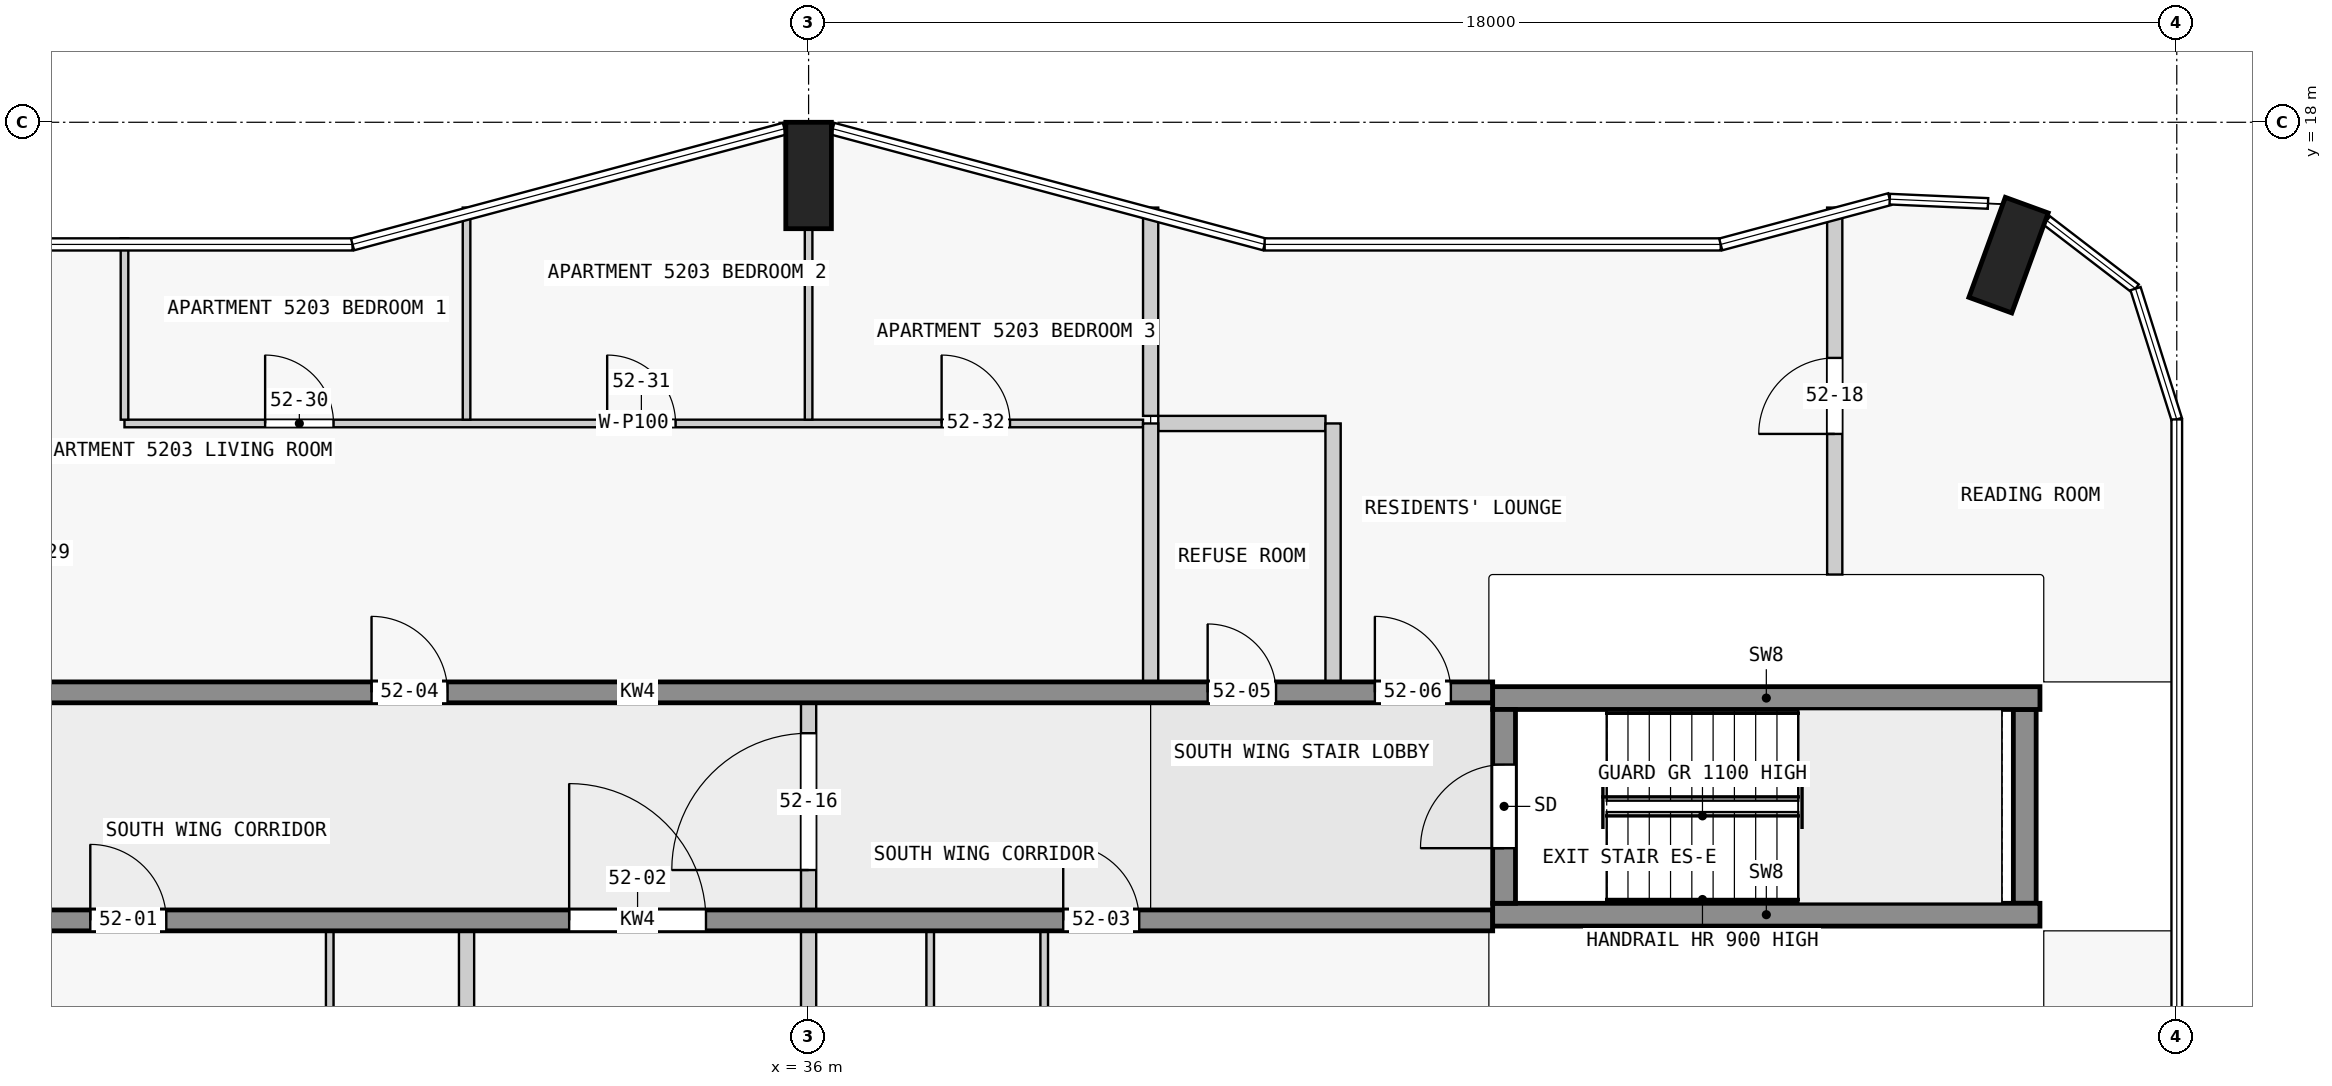
"""IFC4 building model, lengths in metres.
Left out: names, types, materials, properties, quantities, classifications, styles, units other than length and angle.
Written with IfcOpenShell. Run it as: python <this file> out.ifc"""

import sys

from ifc_helpers import new_model, si_unit, direction, frame, frame_2d, origin, origin_2d, place, context, subcontext, project, spatial, rectangle, extrude, element, fill, save


model = new_model("IFC4")
c1 = context("Model", 3, precision=1e-05, world=origin(), true_north=direction((0.0, 1.0)))
c2 = subcontext(c1, "Body", "Model", "MODEL_VIEW")
j1 = project(units=[si_unit("LENGTHUNIT", "METRE"), si_unit("PLANEANGLEUNIT", "RADIAN")], contexts=[c1])
p1 = place(None, origin())
s1 = spatial("IfcSite", under=j1, at=p1, CompositionType="ELEMENT")
p2 = place(p1, origin())
s2 = spatial("IfcBuilding", under=s1, at=p2, CompositionType="ELEMENT")
p3 = place(p2, frame((0.0, 0.0, 201.4)))
s3 = spatial("IfcBuildingStorey", under=s2, at=p3, CompositionType="ELEMENT", Elevation=201.4)
for number, where, z_axis, x_axis in (
    (1, (51.787, 16.252, 0.0), (0.0, 0.0, 1.0), (-0.94, 0.342, 0.0)),
    (2, (36.0, 17.3, 0.0), (0.0, 0.0, 1.0), (1.0, 0.0, 0.0)),
):
    element("IfcColumn", number, at=place(p3, frame(where, z_axis=z_axis, x_axis=x_axis)), inside=s3, PredefinedType="COLUMN", context=c2, shape_type="SweptSolid", body=[
        extrude(rectangle(XDim=0.6, YDim=1.4, at=origin_2d()), origin(), (0.0, 0.0, 1.0), 3.5),
    ])
p4 = place(p3, frame((45.15, 7.725, 0.0), z_axis=(0.0, 0.0, 1.0), x_axis=(0.0, 1.0, 0.0)))
e3 = element("IfcWall", 3, at=p4, inside=s3, PredefinedType="SHEAR", context=c2, shape_type="SweptSolid", body=[
    extrude(rectangle(XDim=2.55, YDim=0.3, at=frame_2d((1.275, 0.0))), origin(), (0.0, 0.0, 1.0), 3.5),
])
p5 = place(p4, frame((0.725, 0.0, 0.0)))
e4 = element("IfcOpeningElement", 4, at=p5, cuts=e3, PredefinedType="OPENING", context=c2, shape_type="SweptSolid", body=[
    extrude(rectangle(XDim=1.1, YDim=2.1, at=frame_2d((0.55, 1.05))), frame((0.0, 0.16, 0.0), z_axis=(0.0, -1.0, 0.0), x_axis=(1.0, 0.0, 0.0)), (0.0, 0.0, 1.0), 0.32),
])
p6 = place(p3, frame((52.0, 7.725, 0.0), z_axis=(0.0, 0.0, 1.0), x_axis=(0.0, 1.0, 0.0)))
e5 = element("IfcWall", 5, at=p6, inside=s3, PredefinedType="SHEAR", context=c2, shape_type="SweptSolid", body=[
    extrude(rectangle(XDim=2.55, YDim=0.3, at=frame_2d((1.275, 0.0))), origin(), (0.0, 0.0, 1.0), 3.5),
])
for number, where, z_axis, x_axis in (
    (6, (45.0, 7.575, 0.0), (0.0, 0.0, 1.0), (1.0, 0.0, 0.0)),
    (7, (45.0, 10.425, 0.0), (0.0, 0.0, 1.0), (1.0, 0.0, 0.0)),
):
    element("IfcWall", number, at=place(p3, frame(where, z_axis=z_axis, x_axis=x_axis)), inside=s3, PredefinedType="SHEAR", context=c2, shape_type="SweptSolid", body=[
        extrude(rectangle(XDim=7.2, YDim=0.3, at=frame_2d((3.6, 0.0))), origin(), (0.0, 0.0, 1.0), 3.5),
    ])
p7 = place(p3, frame((22.5, 7.5, 0.0), z_axis=(0.0, 0.0, 1.0), x_axis=(1.0, 0.0, 0.0)))
e8 = element("IfcWall", 8, at=p7, inside=s3, PredefinedType="SHEAR", context=c2, shape_type="SweptSolid", body=[
    extrude(rectangle(XDim=22.5, YDim=0.275, at=frame_2d((11.25, 0.0))), origin(), (0.0, 0.0, 1.0), 3.25),
])
p8 = place(p7, frame((4.05, 0.0, 0.0)))
e9 = element("IfcOpeningElement", 9, at=p8, cuts=e8, PredefinedType="OPENING", context=c2, shape_type="SweptSolid", body=[
    extrude(rectangle(XDim=1.0, YDim=2.1, at=frame_2d((0.5, 1.05))), frame((0.0, 0.147, 0.0), z_axis=(0.0, -1.0, 0.0), x_axis=(1.0, 0.0, 0.0)), (0.0, 0.0, 1.0), 0.295),
])
p9 = place(p7, frame((10.35, 0.0, 0.0)))
e10 = element("IfcOpeningElement", 10, at=p9, cuts=e8, PredefinedType="OPENING", context=c2, shape_type="SweptSolid", body=[
    extrude(rectangle(XDim=1.8, YDim=2.1, at=frame_2d((0.9, 1.05))), frame((0.0, 0.147, 0.0), z_axis=(0.0, -1.0, 0.0), x_axis=(1.0, 0.0, 0.0)), (0.0, 0.0, 1.0), 0.295),
])
p10 = place(p7, frame((16.85, 0.0, 0.0)))
e11 = element("IfcOpeningElement", 11, at=p10, cuts=e8, PredefinedType="OPENING", context=c2, shape_type="SweptSolid", body=[
    extrude(rectangle(XDim=1.0, YDim=2.1, at=frame_2d((0.5, 1.05))), frame((0.0, 0.147, 0.0), z_axis=(0.0, -1.0, 0.0), x_axis=(1.0, 0.0, 0.0)), (0.0, 0.0, 1.0), 0.295),
])
p11 = place(p3, frame((22.5, 10.5, 0.0), z_axis=(0.0, 0.0, 1.0), x_axis=(1.0, 0.0, 0.0)))
e12 = element("IfcWall", 12, at=p11, inside=s3, PredefinedType="SHEAR", context=c2, shape_type="SweptSolid", body=[
    extrude(rectangle(XDim=22.5, YDim=0.275, at=frame_2d((11.25, 0.0))), origin(), (0.0, 0.0, 1.0), 3.25),
])
p12 = place(p11, frame((7.75, 0.0, 0.0)))
e13 = element("IfcOpeningElement", 13, at=p12, cuts=e12, PredefinedType="OPENING", context=c2, shape_type="SweptSolid", body=[
    extrude(rectangle(XDim=1.0, YDim=2.1, at=frame_2d((0.5, 1.05))), frame((0.0, 0.147, 0.0), z_axis=(0.0, -1.0, 0.0), x_axis=(1.0, 0.0, 0.0)), (0.0, 0.0, 1.0), 0.295),
])
p13 = place(p11, frame((18.75, 0.0, 0.0)))
e14 = element("IfcOpeningElement", 14, at=p13, cuts=e12, PredefinedType="OPENING", context=c2, shape_type="SweptSolid", body=[
    extrude(rectangle(XDim=0.9, YDim=2.1, at=frame_2d((0.45, 1.05))), frame((0.0, 0.147, 0.0), z_axis=(0.0, -1.0, 0.0), x_axis=(1.0, 0.0, 0.0)), (0.0, 0.0, 1.0), 0.295),
])
p14 = place(p11, frame((20.95, 0.0, 0.0)))
e15 = element("IfcOpeningElement", 15, at=p14, cuts=e12, PredefinedType="OPENING", context=c2, shape_type="SweptSolid", body=[
    extrude(rectangle(XDim=1.0, YDim=2.1, at=frame_2d((0.5, 1.05))), frame((0.0, 0.147, 0.0), z_axis=(0.0, -1.0, 0.0), x_axis=(1.0, 0.0, 0.0)), (0.0, 0.0, 1.0), 0.295),
])
p15 = place(p3, frame((27.0, 14.038, 0.0), z_axis=(0.0, 0.0, 1.0), x_axis=(1.0, 0.0, 0.0)))
e16 = element("IfcWall", 16, at=p15, inside=s3, PredefinedType="PARTITIONING", context=c2, shape_type="SweptSolid", body=[
    extrude(rectangle(XDim=13.4, YDim=0.1, at=frame_2d((6.7, 0.0))), origin(), (0.0, 0.0, 1.0), 3.25),
])
p16 = place(p15, frame((1.85, 0.0, 0.0)))
e17 = element("IfcOpeningElement", 17, at=p16, cuts=e16, PredefinedType="OPENING", context=c2, shape_type="SweptSolid", body=[
    extrude(rectangle(XDim=0.9, YDim=2.1, at=frame_2d((0.45, 1.05))), frame((0.0, 0.06, 0.0), z_axis=(0.0, -1.0, 0.0), x_axis=(1.0, 0.0, 0.0)), (0.0, 0.0, 1.0), 0.12),
])
p17 = place(p15, frame((6.35, 0.0, 0.0)))
e18 = element("IfcOpeningElement", 18, at=p17, cuts=e16, PredefinedType="OPENING", context=c2, shape_type="SweptSolid", body=[
    extrude(rectangle(XDim=0.9, YDim=2.1, at=frame_2d((0.45, 1.05))), frame((0.0, 0.06, 0.0), z_axis=(0.0, -1.0, 0.0), x_axis=(1.0, 0.0, 0.0)), (0.0, 0.0, 1.0), 0.12),
])
p18 = place(p15, frame((10.75, 0.0, 0.0)))
e19 = element("IfcOpeningElement", 19, at=p18, cuts=e16, PredefinedType="OPENING", context=c2, shape_type="SweptSolid", body=[
    extrude(rectangle(XDim=0.9, YDim=2.1, at=frame_2d((0.45, 1.05))), frame((0.0, 0.06, 0.0), z_axis=(0.0, -1.0, 0.0), x_axis=(1.0, 0.0, 0.0)), (0.0, 0.0, 1.0), 0.12),
])
p19 = place(p3, frame((42.8, 14.038, 0.0), z_axis=(0.0, 0.0, 1.0), x_axis=(-1.0, 0.0, 0.0)))
e20 = element("IfcWall", 20, at=p19, inside=s3, PredefinedType="PARTITIONING", context=c2, shape_type="SweptSolid", body=[
    extrude(rectangle(XDim=2.2, YDim=0.2, at=frame_2d((1.1, 0.0))), origin(), (0.0, 0.0, 1.0), 3.25),
])
p20 = place(p3, frame((27.0, 16.473, 0.0), z_axis=(0.0, 0.0, 1.0), x_axis=(0.0, -1.0, 0.0)))
e21 = element("IfcWall", 21, at=p20, inside=s3, PredefinedType="PARTITIONING", context=c2, shape_type="SweptSolid", body=[
    extrude(rectangle(XDim=2.386, YDim=0.1, at=frame_2d((1.193, 0.0))), origin(), (0.0, 0.0, 1.0), 3.25),
])
p21 = place(p3, frame((29.7, 7.363, 0.0), z_axis=(0.0, 0.0, 1.0), x_axis=(0.0, -1.0, 0.0)))
e22 = element("IfcWall", 22, at=p21, inside=s3, PredefinedType="PARTITIONING", context=c2, shape_type="SweptSolid", body=[
    extrude(rectangle(XDim=3.4, YDim=0.1, at=frame_2d((1.7, 0.0))), origin(), (0.0, 0.0, 1.0), 3.25),
])
p22 = place(p21, frame((1.25, 0.0, 0.0)))
e23 = element("IfcOpeningElement", 23, at=p22, cuts=e22, PredefinedType="OPENING", context=c2, shape_type="SweptSolid", body=[
    extrude(rectangle(XDim=0.9, YDim=2.1, at=frame_2d((0.45, 1.05))), frame((0.0, 0.06, 0.0), z_axis=(0.0, -1.0, 0.0), x_axis=(1.0, 0.0, 0.0)), (0.0, 0.0, 1.0), 0.12),
])
p23 = place(p3, frame((31.5, 14.087, 0.0), z_axis=(0.0, 0.0, 1.0), x_axis=(0.0, 1.0, 0.0)))
e24 = element("IfcWall", 24, at=p23, inside=s3, PredefinedType="PARTITIONING", context=c2, shape_type="SweptSolid", body=[
    extrude(rectangle(XDim=2.79, YDim=0.1, at=frame_2d((1.395, 0.0))), origin(), (0.0, 0.0, 1.0), 3.25),
])
p24 = place(p3, frame((31.5, 3.962, 0.0), z_axis=(0.0, 0.0, 1.0), x_axis=(0.0, 1.0, 0.0)))
e25 = element("IfcWall", 25, at=p24, inside=s3, PredefinedType="PARTITIONING", context=c2, shape_type="SweptSolid", body=[
    extrude(rectangle(XDim=3.4, YDim=0.2, at=frame_2d((1.7, 0.0))), origin(), (0.0, 0.0, 1.0), 3.25),
])
p25 = place(p3, frame((36.0, 14.087, 0.0), z_axis=(0.0, 0.0, 1.0), x_axis=(0.0, 1.0, 0.0)))
e26 = element("IfcWall", 26, at=p25, inside=s3, PredefinedType="PARTITIONING", context=c2, shape_type="SweptSolid", body=[
    extrude(rectangle(XDim=2.513, YDim=0.1, at=frame_2d((1.256, 0.0))), origin(), (0.0, 0.0, 1.0), 3.25),
])
p26 = place(p3, frame((36.0, 1.4, 0.0), z_axis=(0.0, 0.0, 1.0), x_axis=(0.0, 1.0, 0.0)))
e27 = element("IfcWall", 27, at=p26, inside=s3, PredefinedType="PARTITIONING", context=c2, shape_type="SweptSolid", body=[
    extrude(rectangle(XDim=5.963, YDim=0.2, at=frame_2d((2.981, 0.0))), origin(), (0.0, 0.0, 1.0), 3.25),
])
p27 = place(p3, frame((37.6, 3.962, 0.0), z_axis=(0.0, 0.0, 1.0), x_axis=(0.0, 1.0, 0.0)))
e28 = element("IfcWall", 28, at=p27, inside=s3, PredefinedType="PARTITIONING", context=c2, shape_type="SweptSolid", body=[
    extrude(rectangle(XDim=3.4, YDim=0.1, at=frame_2d((1.7, 0.0))), origin(), (0.0, 0.0, 1.0), 3.25),
])
p28 = place(p3, frame((39.1, 3.962, 0.0), z_axis=(0.0, 0.0, 1.0), x_axis=(0.0, 1.0, 0.0)))
e29 = element("IfcWall", 29, at=p28, inside=s3, PredefinedType="PARTITIONING", context=c2, shape_type="SweptSolid", body=[
    extrude(rectangle(XDim=3.4, YDim=0.1, at=frame_2d((1.7, 0.0))), origin(), (0.0, 0.0, 1.0), 3.25),
])
p29 = place(p28, frame((1.25, 0.0, 0.0)))
e30 = element("IfcOpeningElement", 30, at=p29, cuts=e29, PredefinedType="OPENING", context=c2, shape_type="SweptSolid", body=[
    extrude(rectangle(XDim=0.9, YDim=2.1, at=frame_2d((0.45, 1.05))), frame((0.0, 0.06, 0.0), z_axis=(0.0, -1.0, 0.0), x_axis=(1.0, 0.0, 0.0)), (0.0, 0.0, 1.0), 0.12),
])
p30 = place(p3, frame((40.5, 14.038, 0.0), z_axis=(0.0, 0.0, 1.0), x_axis=(0.0, -1.0, 0.0)))
e31 = element("IfcWall", 31, at=p30, inside=s3, PredefinedType="PARTITIONING", context=c2, shape_type="SweptSolid", body=[
    extrude(rectangle(XDim=3.4, YDim=0.2, at=frame_2d((1.7, 0.0))), origin(), (0.0, 0.0, 1.0), 3.25),
])
p31 = place(p3, frame((40.5, 14.137, 0.0), z_axis=(0.0, 0.0, 1.0), x_axis=(0.0, 1.0, 0.0)))
e32 = element("IfcWall", 32, at=p31, inside=s3, PredefinedType="PARTITIONING", context=c2, shape_type="SweptSolid", body=[
    extrude(rectangle(XDim=2.74, YDim=0.2, at=frame_2d((1.37, 0.0))), origin(), (0.0, 0.0, 1.0), 3.25),
])
p32 = place(p3, frame((42.9, 10.637, 0.0), z_axis=(0.0, 0.0, 1.0), x_axis=(0.0, 1.0, 0.0)))
e33 = element("IfcWall", 33, at=p32, inside=s3, PredefinedType="PARTITIONING", context=c2, shape_type="SweptSolid", body=[
    extrude(rectangle(XDim=3.4, YDim=0.2, at=frame_2d((1.7, 0.0))), origin(), (0.0, 0.0, 1.0), 3.25),
])
p33 = place(p3, frame((49.5, 12.05, 0.0), z_axis=(0.0, 0.0, 1.0), x_axis=(0.0, 1.0, 0.0)))
e34 = element("IfcWall", 34, at=p33, inside=s3, PredefinedType="PARTITIONING", context=c2, shape_type="SweptSolid", body=[
    extrude(rectangle(XDim=4.828, YDim=0.2, at=frame_2d((2.414, 0.0))), origin(), (0.0, 0.0, 1.0), 3.25),
])
p34 = place(p33, frame((1.85, 0.0, 0.0)))
e35 = element("IfcOpeningElement", 35, at=p34, cuts=e34, PredefinedType="OPENING", context=c2, shape_type="SweptSolid", body=[
    extrude(rectangle(XDim=1.0, YDim=2.1, at=frame_2d((0.5, 1.05))), frame((0.0, 0.11, 0.0), z_axis=(0.0, -1.0, 0.0), x_axis=(1.0, 0.0, 0.0)), (0.0, 0.0, 1.0), 0.22),
])
p35 = place(p3, frame((36.0, 7.462, 0.0), z_axis=(0.0, 0.0, 1.0), x_axis=(0.0, 1.0, 0.0)))
e36 = element("IfcWall", 36, at=p35, inside=s3, PredefinedType="PARTITIONING", context=c2, shape_type="SweptSolid", body=[
    extrude(rectangle(XDim=3.175, YDim=0.2, at=frame_2d((1.587, 0.0))), origin(), (0.0, 0.0, 1.0), 3.25),
])
p36 = place(p35, frame((0.7, 0.0, 0.0)))
e37 = element("IfcOpeningElement", 37, at=p36, cuts=e36, PredefinedType="OPENING", context=c2, shape_type="SweptSolid", body=[
    extrude(rectangle(XDim=1.8, YDim=2.1, at=frame_2d((0.9, 1.05))), frame((0.0, 0.11, 0.0), z_axis=(0.0, -1.0, 0.0), x_axis=(1.0, 0.0, 0.0)), (0.0, 0.0, 1.0), 0.22),
])
p37 = place(p5, origin())
e38 = element("IfcDoor", 38, at=p37, inside=s3, OperationType="SINGLE_SWING_LEFT", PredefinedType="DOOR", context=c2, shape_type="SweptSolid", body=[
    extrude(rectangle(XDim=1.1, YDim=2.1, at=frame_2d((0.55, 1.05))), frame((0.0, 0.025, 0.0), z_axis=(0.0, -1.0, 0.0), x_axis=(1.0, 0.0, 0.0)), (0.0, 0.0, 1.0), 0.05),
])
fill(e4, e38)
p38 = place(p8, origin())
e39 = element("IfcDoor", 39, at=p38, inside=s3, OperationType="SINGLE_SWING_LEFT", PredefinedType="DOOR", context=c2, shape_type="SweptSolid", body=[
    extrude(rectangle(XDim=1.0, YDim=2.1, at=frame_2d((0.5, 1.05))), frame((0.0, 0.025, 0.0), z_axis=(0.0, -1.0, 0.0), x_axis=(1.0, 0.0, 0.0)), (0.0, 0.0, 1.0), 0.05),
])
fill(e9, e39)
p39 = place(p9, origin())
e40 = element("IfcDoor", 40, at=p39, inside=s3, OperationType="SINGLE_SWING_LEFT", PredefinedType="DOOR", context=c2, shape_type="SweptSolid", body=[
    extrude(rectangle(XDim=1.8, YDim=2.1, at=frame_2d((0.9, 1.05))), frame((0.0, 0.025, 0.0), z_axis=(0.0, -1.0, 0.0), x_axis=(1.0, 0.0, 0.0)), (0.0, 0.0, 1.0), 0.05),
])
fill(e10, e40)
p40 = place(p10, origin())
e41 = element("IfcDoor", 41, at=p40, inside=s3, OperationType="SINGLE_SWING_RIGHT", PredefinedType="DOOR", context=c2, shape_type="SweptSolid", body=[
    extrude(rectangle(XDim=1.0, YDim=2.1, at=frame_2d((0.5, 1.05))), frame((0.0, 0.025, 0.0), z_axis=(0.0, -1.0, 0.0), x_axis=(1.0, 0.0, 0.0)), (0.0, 0.0, 1.0), 0.05),
])
fill(e11, e41)
p41 = place(p12, origin())
e42 = element("IfcDoor", 42, at=p41, inside=s3, OperationType="SINGLE_SWING_LEFT", PredefinedType="DOOR", context=c2, shape_type="SweptSolid", body=[
    extrude(rectangle(XDim=1.0, YDim=2.1, at=frame_2d((0.5, 1.05))), frame((0.0, 0.025, 0.0), z_axis=(0.0, -1.0, 0.0), x_axis=(1.0, 0.0, 0.0)), (0.0, 0.0, 1.0), 0.05),
])
fill(e13, e42)
p42 = place(p13, origin())
e43 = element("IfcDoor", 43, at=p42, inside=s3, OperationType="SINGLE_SWING_RIGHT", PredefinedType="DOOR", context=c2, shape_type="SweptSolid", body=[
    extrude(rectangle(XDim=0.9, YDim=2.1, at=frame_2d((0.45, 1.05))), frame((0.0, 0.025, 0.0), z_axis=(0.0, -1.0, 0.0), x_axis=(1.0, 0.0, 0.0)), (0.0, 0.0, 1.0), 0.05),
])
fill(e14, e43)
p43 = place(p14, origin())
e44 = element("IfcDoor", 44, at=p43, inside=s3, OperationType="SINGLE_SWING_RIGHT", PredefinedType="DOOR", context=c2, shape_type="SweptSolid", body=[
    extrude(rectangle(XDim=1.0, YDim=2.1, at=frame_2d((0.5, 1.05))), frame((0.0, 0.025, 0.0), z_axis=(0.0, -1.0, 0.0), x_axis=(1.0, 0.0, 0.0)), (0.0, 0.0, 1.0), 0.05),
])
fill(e15, e44)
p44 = place(p36, origin())
e45 = element("IfcDoor", 45, at=p44, inside=s3, OperationType="SINGLE_SWING_RIGHT", PredefinedType="DOOR", context=c2, shape_type="SweptSolid", body=[
    extrude(rectangle(XDim=1.8, YDim=2.1, at=frame_2d((0.9, 1.05))), frame((0.0, 0.025, 0.0), z_axis=(0.0, -1.0, 0.0), x_axis=(1.0, 0.0, 0.0)), (0.0, 0.0, 1.0), 0.05),
])
fill(e37, e45)
p45 = place(p34, origin())
e46 = element("IfcDoor", 46, at=p45, inside=s3, OperationType="SINGLE_SWING_LEFT", PredefinedType="DOOR", context=c2, shape_type="SweptSolid", body=[
    extrude(rectangle(XDim=1.0, YDim=2.1, at=frame_2d((0.5, 1.05))), frame((0.0, 0.025, 0.0), z_axis=(0.0, -1.0, 0.0), x_axis=(1.0, 0.0, 0.0)), (0.0, 0.0, 1.0), 0.05),
])
fill(e35, e46)
p46 = place(p16, origin())
e47 = element("IfcDoor", 47, at=p46, inside=s3, OperationType="SINGLE_SWING_LEFT", PredefinedType="DOOR", context=c2, shape_type="SweptSolid", body=[
    extrude(rectangle(XDim=0.9, YDim=2.1, at=frame_2d((0.45, 1.05))), frame((0.0, 0.025, 0.0), z_axis=(0.0, -1.0, 0.0), x_axis=(1.0, 0.0, 0.0)), (0.0, 0.0, 1.0), 0.05),
])
fill(e17, e47)
p47 = place(p17, origin())
e48 = element("IfcDoor", 48, at=p47, inside=s3, OperationType="SINGLE_SWING_RIGHT", PredefinedType="DOOR", context=c2, shape_type="SweptSolid", body=[
    extrude(rectangle(XDim=0.9, YDim=2.1, at=frame_2d((0.45, 1.05))), frame((0.0, 0.025, 0.0), z_axis=(0.0, -1.0, 0.0), x_axis=(1.0, 0.0, 0.0)), (0.0, 0.0, 1.0), 0.05),
])
fill(e18, e48)
p48 = place(p18, origin())
e49 = element("IfcDoor", 49, at=p48, inside=s3, OperationType="SINGLE_SWING_RIGHT", PredefinedType="DOOR", context=c2, shape_type="SweptSolid", body=[
    extrude(rectangle(XDim=0.9, YDim=2.1, at=frame_2d((0.45, 1.05))), frame((0.0, 0.025, 0.0), z_axis=(0.0, -1.0, 0.0), x_axis=(1.0, 0.0, 0.0)), (0.0, 0.0, 1.0), 0.05),
])
fill(e19, e49)
save(model, sys.argv[1])
